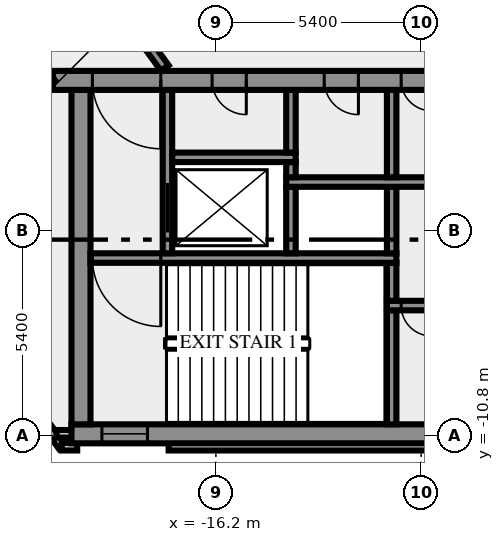
"""IFC4 building model, lengths in metres.
Left out: names, types, materials, properties, quantities, classifications, styles, units other than length and angle.
Written with IfcOpenShell. Run it as: python <this file> out.ifc"""

import sys

from ifc_helpers import new_model, si_unit, direction, frame, frame_2d, origin, place, context, subcontext, project, spatial, rectangle, extrude, element, fill, save


model = new_model("IFC4")
c1 = context("Model", 3, precision=1e-05, world=origin(), true_north=direction((0.0, 1.0)))
c2 = subcontext(c1, "Body", "Model", "MODEL_VIEW")
j1 = project(units=[si_unit("LENGTHUNIT", "METRE"), si_unit("PLANEANGLEUNIT", "RADIAN")], contexts=[c1])
p1 = place(None, origin())
s1 = spatial("IfcSite", under=j1, at=p1, CompositionType="ELEMENT")
p2 = place(p1, origin())
s2 = spatial("IfcBuilding", under=s1, at=p2, CompositionType="ELEMENT")
p3 = place(p2, frame((0.0, 0.0, 315.0)))
s3 = spatial("IfcBuildingStorey", under=s2, at=p3, CompositionType="ELEMENT", Elevation=315.0)
p4 = place(p3, frame((-21.833, -8.909, 0.0), z_axis=(0.0, 0.0, 1.0), x_axis=(0.587766567315, -0.809030569476, 0.0)))
e1 = element("IfcWall", 1, at=p4, inside=s3, PredefinedType="SOLIDWALL", context=c2, shape_type="SweptSolid", body=[
    extrude(rectangle(XDim=2.688, YDim=0.2, at=frame_2d((1.344, 0.0))), origin(), (0.0, 0.0, 1.0), 3.65),
])
p5 = place(p3, frame((-20.256, -11.088, 0.0), z_axis=(0.0, 0.0, 1.0), x_axis=(1.0, 0.0, 0.0)))
e2 = element("IfcWall", 2, at=p5, inside=s3, PredefinedType="SOLIDWALL", context=c2, shape_type="SweptSolid", body=[
    extrude(rectangle(XDim=0.406, YDim=0.2, at=frame_2d((0.203, 0.0))), origin(), (0.0, 0.0, 1.0), 3.65),
])
p6 = place(p3, frame((-17.444, -11.088, 0.0), z_axis=(0.0, 0.0, 1.0), x_axis=(1.0, 0.0, 0.0)))
e3 = element("IfcWall", 3, at=p6, inside=s3, PredefinedType="SOLIDWALL", context=c2, shape_type="SweptSolid", body=[
    extrude(rectangle(XDim=34.888, YDim=0.2, at=frame_2d((17.444, 0.0))), origin(), (0.0, 0.0, 1.0), 3.65),
])
p7 = place(p3, frame((-19.98, -10.75, 0.0), z_axis=(0.0, 0.0, 1.0), x_axis=(-1.0, 0.0, 0.0)))
e4 = element("IfcWall", 4, at=p7, inside=s3, PredefinedType="SOLIDWALL", context=c2, shape_type="SweptSolid", body=[
    extrude(rectangle(XDim=0.417, YDim=0.2, at=frame_2d((0.208, 0.0))), origin(), (0.0, 0.0, 1.0), 3.65),
])
p8 = place(p3, frame((-20.0, -10.75, 0.0), z_axis=(0.0, 0.0, 1.0), x_axis=(1.0, 0.0, 0.0)))
e5 = element("IfcWall", 5, at=p8, inside=s3, PredefinedType="SHEAR", context=c2, shape_type="SweptSolid", body=[
    extrude(rectangle(XDim=40.0, YDim=0.5, at=frame_2d((20.0, 0.0))), origin(), (0.0, 0.0, 1.0), 3.65),
])
p9 = place(p8, frame((0.8, 0.0, 1.0)))
e6 = element("IfcOpeningElement", 6, at=p9, cuts=e5, PredefinedType="OPENING", context=c2, shape_type="SweptSolid", body=[
    extrude(rectangle(XDim=1.2, YDim=1.2, at=frame_2d((0.6, 0.6))), frame((0.0, 0.26, 0.0), z_axis=(0.0, -1.0, 0.0), x_axis=(1.0, 0.0, 0.0)), (0.0, 0.0, 1.0), 0.52),
])
p10 = place(p8, frame((38.0, 0.0, 1.0)))
e7 = element("IfcOpeningElement", 7, at=p10, cuts=e5, PredefinedType="OPENING", context=c2, shape_type="SweptSolid", body=[
    extrude(rectangle(XDim=1.2, YDim=1.2, at=frame_2d((0.6, 0.6))), frame((0.0, 0.26, 0.0), z_axis=(0.0, -1.0, 0.0), x_axis=(1.0, 0.0, 0.0)), (0.0, 0.0, 1.0), 0.52),
])
p11 = place(p3, frame((-19.75, -10.5, 0.0), z_axis=(0.0, 0.0, 1.0), x_axis=(0.0, 1.0, 0.0)))
e8 = element("IfcWall", 8, at=p11, inside=s3, PredefinedType="SHEAR", context=c2, shape_type="SweptSolid", body=[
    extrude(rectangle(XDim=8.8, YDim=0.5, at=frame_2d((4.4, 0.0))), origin(), (0.0, 0.0, 1.0), 3.65),
])
p12 = place(p3, frame((-11.575, -10.5, 0.0), z_axis=(0.0, 0.0, 1.0), x_axis=(0.0, 1.0, 0.0)))
e9 = element("IfcWall", 9, at=p12, inside=s3, PredefinedType="SHEAR", context=c2, shape_type="SweptSolid", body=[
    extrude(rectangle(XDim=3.0, YDim=0.25, at=frame_2d((1.5, 0.0))), origin(), (0.0, 0.0, 1.0), 3.65),
])
p13 = place(p3, frame((11.7, -7.375, 0.0), z_axis=(0.0, 0.0, 1.0), x_axis=(-1.0, 0.0, 0.0)))
e10 = element("IfcWall", 10, at=p13, inside=s3, PredefinedType="SHEAR", context=c2, shape_type="SweptSolid", body=[
    extrude(rectangle(XDim=23.4, YDim=0.25, at=frame_2d((11.7, 0.0))), origin(), (0.0, 0.0, 1.0), 3.65),
])
p14 = place(p13, frame((22.225, 0.0, 0.0)))
e11 = element("IfcOpeningElement", 11, at=p14, cuts=e10, PredefinedType="OPENING", context=c2, shape_type="SweptSolid", body=[
    extrude(rectangle(XDim=0.8, YDim=2.1, at=frame_2d((0.4, 1.05))), frame((0.0, 0.135, 0.0), z_axis=(0.0, -1.0, 0.0), x_axis=(1.0, 0.0, 0.0)), (0.0, 0.0, 1.0), 0.27),
])
p15 = place(p13, frame((20.2, 0.0, 0.0)))
e12 = element("IfcOpeningElement", 12, at=p15, cuts=e10, PredefinedType="OPENING", context=c2, shape_type="SweptSolid", body=[
    extrude(rectangle(XDim=1.1, YDim=2.1, at=frame_2d((0.55, 1.05))), frame((0.0, 0.135, 0.0), z_axis=(0.0, -1.0, 0.0), x_axis=(1.0, 0.0, 0.0)), (0.0, 0.0, 1.0), 0.27),
])
p16 = place(p13, frame((17.7, 0.0, 0.0)))
e13 = element("IfcOpeningElement", 13, at=p16, cuts=e10, PredefinedType="OPENING", context=c2, shape_type="SweptSolid", body=[
    extrude(rectangle(XDim=1.1, YDim=2.1, at=frame_2d((0.55, 1.05))), frame((0.0, 0.135, 0.0), z_axis=(0.0, -1.0, 0.0), x_axis=(1.0, 0.0, 0.0)), (0.0, 0.0, 1.0), 0.27),
])
p17 = place(p13, frame((15.975, 0.0, 0.0)))
e14 = element("IfcOpeningElement", 14, at=p17, cuts=e10, PredefinedType="OPENING", context=c2, shape_type="SweptSolid", body=[
    extrude(rectangle(XDim=0.8, YDim=2.1, at=frame_2d((0.4, 1.05))), frame((0.0, 0.135, 0.0), z_axis=(0.0, -1.0, 0.0), x_axis=(1.0, 0.0, 0.0)), (0.0, 0.0, 1.0), 0.27),
])
p18 = place(p13, frame((14.65, 0.0, 0.0)))
e15 = element("IfcOpeningElement", 15, at=p18, cuts=e10, PredefinedType="OPENING", context=c2, shape_type="SweptSolid", body=[
    extrude(rectangle(XDim=0.8, YDim=2.1, at=frame_2d((0.4, 1.05))), frame((0.0, 0.135, 0.0), z_axis=(0.0, -1.0, 0.0), x_axis=(1.0, 0.0, 0.0)), (0.0, 0.0, 1.0), 0.27),
])
p19 = place(p13, frame((12.8, 0.0, 0.0)))
e16 = element("IfcOpeningElement", 16, at=p19, cuts=e10, PredefinedType="OPENING", context=c2, shape_type="SweptSolid", body=[
    extrude(rectangle(XDim=0.9, YDim=2.1, at=frame_2d((0.45, 1.05))), frame((0.0, 0.135, 0.0), z_axis=(0.0, -1.0, 0.0), x_axis=(1.0, 0.0, 0.0)), (0.0, 0.0, 1.0), 0.27),
])
p20 = place(p13, frame((10.7, 0.0, 0.0)))
e17 = element("IfcOpeningElement", 17, at=p20, cuts=e10, PredefinedType="OPENING", context=c2, shape_type="SweptSolid", body=[
    extrude(rectangle(XDim=0.9, YDim=2.1, at=frame_2d((0.45, 1.05))), frame((0.0, 0.135, 0.0), z_axis=(0.0, -1.0, 0.0), x_axis=(1.0, 0.0, 0.0)), (0.0, 0.0, 1.0), 0.27),
])
p21 = place(p13, frame((6.237, 0.0, 0.0)))
e18 = element("IfcOpeningElement", 18, at=p21, cuts=e10, PredefinedType="OPENING", context=c2, shape_type="SweptSolid", body=[
    extrude(rectangle(XDim=0.9, YDim=2.1, at=frame_2d((0.45, 1.05))), frame((0.0, 0.135, 0.0), z_axis=(0.0, -1.0, 0.0), x_axis=(1.0, 0.0, 0.0)), (0.0, 0.0, 1.0), 0.27),
])
p22 = place(p13, frame((1.263, 0.0, 0.0)))
e19 = element("IfcOpeningElement", 19, at=p22, cuts=e10, PredefinedType="OPENING", context=c2, shape_type="SweptSolid", body=[
    extrude(rectangle(XDim=0.9, YDim=2.1, at=frame_2d((0.45, 1.05))), frame((0.0, 0.135, 0.0), z_axis=(0.0, -1.0, 0.0), x_axis=(1.0, 0.0, 0.0)), (0.0, 0.0, 1.0), 0.27),
])
p23 = place(p3, frame((-11.575, -7.25, 0.0), z_axis=(0.0, 0.0, 1.0), x_axis=(0.0, 1.0, 0.0)))
e20 = element("IfcWall", 20, at=p23, inside=s3, PredefinedType="SHEAR", context=c2, shape_type="SweptSolid", body=[
    extrude(rectangle(XDim=1.0, YDim=0.25, at=frame_2d((0.5, 0.0))), origin(), (0.0, 0.0, 1.0), 3.65),
])
p24 = place(p3, frame((-11.45, -6.125, 0.0), z_axis=(0.0, 0.0, 1.0), x_axis=(-1.0, 0.0, 0.0)))
e21 = element("IfcWall", 21, at=p24, inside=s3, PredefinedType="SHEAR", context=c2, shape_type="SweptSolid", body=[
    extrude(rectangle(XDim=8.05, YDim=0.25, at=frame_2d((4.025, 0.0))), origin(), (0.0, 0.0, 1.0), 3.65),
])
p25 = place(p24, frame((6.2, 0.0, 0.0)))
e22 = element("IfcOpeningElement", 22, at=p25, cuts=e21, PredefinedType="OPENING", context=c2, shape_type="SweptSolid", body=[
    extrude(rectangle(XDim=1.8, YDim=2.1, at=frame_2d((0.9, 1.05))), frame((0.0, 0.135, 0.0), z_axis=(0.0, -1.0, 0.0), x_axis=(1.0, 0.0, 0.0)), (0.0, 0.0, 1.0), 0.27),
])
p26 = place(p3, frame((-17.475, -6.0, 0.0), z_axis=(0.0, 0.0, 1.0), x_axis=(0.0, 1.0, 0.0)))
e23 = element("IfcWall", 23, at=p26, inside=s3, PredefinedType="SHEAR", context=c2, shape_type="SweptSolid", body=[
    extrude(rectangle(XDim=4.3, YDim=0.25, at=frame_2d((2.15, 0.0))), origin(), (0.0, 0.0, 1.0), 3.65),
])
p27 = place(p26, frame((0.55, 0.0, 0.0)))
e24 = element("IfcOpeningElement", 24, at=p27, cuts=e23, PredefinedType="OPENING", context=c2, shape_type="SweptSolid", body=[
    extrude(rectangle(XDim=1.3, YDim=2.1, at=frame_2d((0.65, 1.05))), frame((0.0, 0.135, 0.0), z_axis=(0.0, -1.0, 0.0), x_axis=(1.0, 0.0, 0.0)), (0.0, 0.0, 1.0), 0.27),
])
for number, where, z_axis, x_axis in (
    (25, (-14.225, -6.0, 0.0), (0.0, 0.0, 1.0), (0.0, 1.0, 0.0)),
    (26, (-11.575, -6.0, 0.0), (0.0, 0.0, 1.0), (0.0, 1.0, 0.0)),
):
    element("IfcWall", number, at=place(p3, frame(where, z_axis=z_axis, x_axis=x_axis)), inside=s3, PredefinedType="SHEAR", context=c2, shape_type="SweptSolid", body=[
        extrude(rectangle(XDim=1.75, YDim=0.25, at=frame_2d((0.875, 0.0))), origin(), (0.0, 0.0, 1.0), 3.65),
    ])
p28 = place(p3, frame((-14.35, -4.125, 0.0), z_axis=(0.0, 0.0, 1.0), x_axis=(1.0, 0.0, 0.0)))
e27 = element("IfcWall", 27, at=p28, inside=s3, PredefinedType="SHEAR", context=c2, shape_type="SweptSolid", body=[
    extrude(rectangle(XDim=10.4, YDim=0.25, at=frame_2d((5.2, 0.0))), origin(), (0.0, 0.0, 1.0), 3.65),
])
p29 = place(p28, frame((4.75, 0.0, 0.0)))
e28 = element("IfcOpeningElement", 28, at=p29, cuts=e27, PredefinedType="OPENING", context=c2, shape_type="SweptSolid", body=[
    extrude(rectangle(XDim=1.1, YDim=2.1, at=frame_2d((0.55, 1.05))), frame((0.0, 0.135, 0.0), z_axis=(0.0, -1.0, 0.0), x_axis=(1.0, 0.0, 0.0)), (0.0, 0.0, 1.0), 0.27),
])
p30 = place(p28, frame((7.25, 0.0, 0.0)))
e29 = element("IfcOpeningElement", 29, at=p30, cuts=e27, PredefinedType="OPENING", context=c2, shape_type="SweptSolid", body=[
    extrude(rectangle(XDim=1.1, YDim=2.1, at=frame_2d((0.55, 1.05))), frame((0.0, 0.135, 0.0), z_axis=(0.0, -1.0, 0.0), x_axis=(1.0, 0.0, 0.0)), (0.0, 0.0, 1.0), 0.27),
])
p31 = place(p3, frame((-14.225, -4.0, 0.0), z_axis=(0.0, 0.0, 1.0), x_axis=(0.0, 1.0, 0.0)))
e30 = element("IfcWall", 30, at=p31, inside=s3, PredefinedType="SHEAR", context=c2, shape_type="SweptSolid", body=[
    extrude(rectangle(XDim=0.4, YDim=0.25, at=frame_2d((0.2, 0.0))), origin(), (0.0, 0.0, 1.0), 3.65),
])
p32 = place(p3, frame((-11.575, -4.0, 0.0), z_axis=(0.0, 0.0, 1.0), x_axis=(0.0, 1.0, 0.0)))
e31 = element("IfcWall", 31, at=p32, inside=s3, PredefinedType="SHEAR", context=c2, shape_type="SweptSolid", body=[
    extrude(rectangle(XDim=2.3, YDim=0.25, at=frame_2d((1.15, 0.0))), origin(), (0.0, 0.0, 1.0), 3.65),
])
p33 = place(p3, frame((-17.35, -3.475, 0.0), z_axis=(0.0, 0.0, 1.0), x_axis=(1.0, 0.0, 0.0)))
e32 = element("IfcWall", 32, at=p33, inside=s3, PredefinedType="SHEAR", context=c2, shape_type="SweptSolid", body=[
    extrude(rectangle(XDim=3.25, YDim=0.25, at=frame_2d((1.625, 0.0))), origin(), (0.0, 0.0, 1.0), 3.65),
])
p34 = place(p3, frame((-14.225, -3.35, 0.0), z_axis=(0.0, 0.0, 1.0), x_axis=(0.0, 1.0, 0.0)))
e33 = element("IfcWall", 33, at=p34, inside=s3, PredefinedType="SHEAR", context=c2, shape_type="SweptSolid", body=[
    extrude(rectangle(XDim=1.65, YDim=0.25, at=frame_2d((0.825, 0.0))), origin(), (0.0, 0.0, 1.0), 3.65),
])
p35 = place(p3, frame((20.49, -1.45, 0.0), z_axis=(0.0, 0.0, 1.0), x_axis=(-1.0, 0.0, 0.0)))
e34 = element("IfcWall", 34, at=p35, inside=s3, PredefinedType="SHEAR", context=c2, shape_type="SweptSolid", body=[
    extrude(rectangle(XDim=40.98, YDim=0.5, at=frame_2d((20.49, 0.0))), origin(), (0.0, 0.0, 1.0), 3.65),
])
p36 = place(p35, frame((38.14, 0.0, 0.0)))
e35 = element("IfcOpeningElement", 35, at=p36, cuts=e34, PredefinedType="OPENING", context=c2, shape_type="SweptSolid", body=[
    extrude(rectangle(XDim=1.8, YDim=2.1, at=frame_2d((0.9, 1.05))), frame((0.0, 0.26, 0.0), z_axis=(0.0, -1.0, 0.0), x_axis=(1.0, 0.0, 0.0)), (0.0, 0.0, 1.0), 0.52),
])
p37 = place(p35, frame((35.89, 0.0, 0.0)))
e36 = element("IfcOpeningElement", 36, at=p37, cuts=e34, PredefinedType="OPENING", context=c2, shape_type="SweptSolid", body=[
    extrude(rectangle(XDim=0.9, YDim=2.1, at=frame_2d((0.45, 1.05))), frame((0.0, 0.26, 0.0), z_axis=(0.0, -1.0, 0.0), x_axis=(1.0, 0.0, 0.0)), (0.0, 0.0, 1.0), 0.52),
])
p38 = place(p35, frame((32.94, 0.0, 0.0)))
e37 = element("IfcOpeningElement", 37, at=p38, cuts=e34, PredefinedType="OPENING", context=c2, shape_type="SweptSolid", body=[
    extrude(rectangle(XDim=0.9, YDim=2.1, at=frame_2d((0.45, 1.05))), frame((0.0, 0.26, 0.0), z_axis=(0.0, -1.0, 0.0), x_axis=(1.0, 0.0, 0.0)), (0.0, 0.0, 1.0), 0.52),
])
p39 = place(p35, frame((31.015, 0.0, 0.0)))
e38 = element("IfcOpeningElement", 38, at=p39, cuts=e34, PredefinedType="OPENING", context=c2, shape_type="SweptSolid", body=[
    extrude(rectangle(XDim=0.8, YDim=2.1, at=frame_2d((0.4, 1.05))), frame((0.0, 0.26, 0.0), z_axis=(0.0, -1.0, 0.0), x_axis=(1.0, 0.0, 0.0)), (0.0, 0.0, 1.0), 0.52),
])
p40 = place(p35, frame((24.765, 0.0, 0.0)))
e39 = element("IfcOpeningElement", 39, at=p40, cuts=e34, PredefinedType="OPENING", context=c2, shape_type="SweptSolid", body=[
    extrude(rectangle(XDim=0.8, YDim=2.1, at=frame_2d((0.4, 1.05))), frame((0.0, 0.26, 0.0), z_axis=(0.0, -1.0, 0.0), x_axis=(1.0, 0.0, 0.0)), (0.0, 0.0, 1.0), 0.52),
])
p41 = place(p35, frame((21.765, 0.0, 0.0)))
e40 = element("IfcOpeningElement", 40, at=p41, cuts=e34, PredefinedType="OPENING", context=c2, shape_type="SweptSolid", body=[
    extrude(rectangle(XDim=2.0, YDim=2.1, at=frame_2d((1.0, 1.05))), frame((0.0, 0.26, 0.0), z_axis=(0.0, -1.0, 0.0), x_axis=(1.0, 0.0, 0.0)), (0.0, 0.0, 1.0), 0.52),
])
p42 = place(p35, frame((12.24, 0.0, 0.0)))
e41 = element("IfcOpeningElement", 41, at=p42, cuts=e34, PredefinedType="OPENING", context=c2, shape_type="SweptSolid", body=[
    extrude(rectangle(XDim=0.9, YDim=2.1, at=frame_2d((0.45, 1.05))), frame((0.0, 0.26, 0.0), z_axis=(0.0, -1.0, 0.0), x_axis=(1.0, 0.0, 0.0)), (0.0, 0.0, 1.0), 0.52),
])
p43 = place(p35, frame((7.14, 0.0, 0.0)))
e42 = element("IfcOpeningElement", 42, at=p43, cuts=e34, PredefinedType="OPENING", context=c2, shape_type="SweptSolid", body=[
    extrude(rectangle(XDim=0.9, YDim=2.1, at=frame_2d((0.45, 1.05))), frame((0.0, 0.26, 0.0), z_axis=(0.0, -1.0, 0.0), x_axis=(1.0, 0.0, 0.0)), (0.0, 0.0, 1.0), 0.52),
])
p44 = place(p35, frame((5.028, 0.0, 0.0)))
e43 = element("IfcOpeningElement", 43, at=p44, cuts=e34, PredefinedType="OPENING", context=c2, shape_type="SweptSolid", body=[
    extrude(rectangle(XDim=0.8, YDim=2.1, at=frame_2d((0.4, 1.05))), frame((0.0, 0.26, 0.0), z_axis=(0.0, -1.0, 0.0), x_axis=(1.0, 0.0, 0.0)), (0.0, 0.0, 1.0), 0.52),
])
p45 = place(p35, frame((3.452, 0.0, 0.0)))
e44 = element("IfcOpeningElement", 44, at=p45, cuts=e34, PredefinedType="OPENING", context=c2, shape_type="SweptSolid", body=[
    extrude(rectangle(XDim=0.8, YDim=2.1, at=frame_2d((0.4, 1.05))), frame((0.0, 0.26, 0.0), z_axis=(0.0, -1.0, 0.0), x_axis=(1.0, 0.0, 0.0)), (0.0, 0.0, 1.0), 0.52),
])
p46 = place(p35, frame((1.04, 0.0, 0.0)))
e45 = element("IfcOpeningElement", 45, at=p46, cuts=e34, PredefinedType="OPENING", context=c2, shape_type="SweptSolid", body=[
    extrude(rectangle(XDim=1.8, YDim=2.1, at=frame_2d((0.9, 1.05))), frame((0.0, 0.26, 0.0), z_axis=(0.0, -1.0, 0.0), x_axis=(1.0, 0.0, 0.0)), (0.0, 0.0, 1.0), 0.52),
])
p47 = place(p3, frame((-20.531, -1.523, 0.0), z_axis=(0.0, 0.0, 1.0), x_axis=(-0.587785867777, 0.809016547199, 0.0)))
e46 = element("IfcWall", 46, at=p47, inside=s3, PredefinedType="SOLIDWALL", context=c2, shape_type="SweptSolid", body=[
    extrude(rectangle(XDim=16.67, YDim=0.25, at=frame_2d((8.335, 0.0))), origin(), (0.0, 0.0, 1.0), 3.65),
])
p48 = place(p47, frame((15.296, 0.0, 0.0)))
e47 = element("IfcOpeningElement", 47, at=p48, cuts=e46, PredefinedType="OPENING", context=c2, shape_type="SweptSolid", body=[
    extrude(rectangle(XDim=0.9, YDim=2.1, at=frame_2d((0.45, 1.05))), frame((0.0, 0.135, 0.0), z_axis=(0.0, -1.0, 0.0), x_axis=(1.0, 0.0, 0.0)), (0.0, 0.0, 1.0), 0.27),
])
p49 = place(p3, frame((-28.039, 13.319, 0.0), z_axis=(0.0, 0.0, 1.0), x_axis=(0.587791911753, -0.809012155952, 0.0)))
e48 = element("IfcWall", 48, at=p49, inside=s3, PredefinedType="SOLIDWALL", context=c2, shape_type="SweptSolid", body=[
    extrude(rectangle(XDim=17.853, YDim=0.25, at=frame_2d((8.927, 0.0))), origin(), (0.0, 0.0, 1.0), 3.65),
])
p50 = place(p49, frame((13.512, 0.0, 0.0)))
e49 = element("IfcOpeningElement", 49, at=p50, cuts=e48, PredefinedType="OPENING", context=c2, shape_type="SweptSolid", body=[
    extrude(rectangle(XDim=0.9, YDim=2.1, at=frame_2d((0.45, 1.05))), frame((0.0, 0.135, 0.0), z_axis=(0.0, -1.0, 0.0), x_axis=(1.0, 0.0, 0.0)), (0.0, 0.0, 1.0), 0.27),
])
p51 = place(p9, origin())
e50 = element("IfcWindow", 50, at=p51, inside=s3, PartitioningType="SINGLE_PANEL", PredefinedType="WINDOW", context=c2, shape_type="SweptSolid", body=[
    extrude(rectangle(XDim=1.2, YDim=1.2, at=frame_2d((0.6, 0.6))), frame((0.0, 0.03, 0.0), z_axis=(0.0, -1.0, 0.0), x_axis=(1.0, 0.0, 0.0)), (0.0, 0.0, 1.0), 0.06),
])
fill(e6, e50)
p52 = place(p14, origin())
e51 = element("IfcDoor", 51, at=p52, inside=s3, OperationType="SINGLE_SWING_RIGHT", PredefinedType="DOOR", context=c2, shape_type="SweptSolid", body=[
    extrude(rectangle(XDim=0.8, YDim=2.1, at=frame_2d((0.4, 1.05))), frame((0.0, 0.025, 0.0), z_axis=(0.0, -1.0, 0.0), x_axis=(1.0, 0.0, 0.0)), (0.0, 0.0, 1.0), 0.05),
])
fill(e11, e51)
p53 = place(p25, origin())
e52 = element("IfcDoor", 52, at=p53, inside=s3, OperationType="DOUBLE_DOOR_SINGLE_SWING", PredefinedType="DOOR", context=c2, shape_type="SweptSolid", body=[
    extrude(rectangle(XDim=1.8, YDim=2.1, at=frame_2d((0.9, 1.05))), frame((0.0, 0.025, 0.0), z_axis=(0.0, -1.0, 0.0), x_axis=(1.0, 0.0, 0.0)), (0.0, 0.0, 1.0), 0.05),
])
fill(e22, e52)
p54 = place(p27, origin())
e53 = element("IfcDoor", 53, at=p54, inside=s3, OperationType="DOUBLE_DOOR_SLIDING", PredefinedType="DOOR", context=c2, shape_type="SweptSolid", body=[
    extrude(rectangle(XDim=1.3, YDim=2.1, at=frame_2d((0.65, 1.05))), frame((0.0, 0.025, 0.0), z_axis=(0.0, -1.0, 0.0), x_axis=(1.0, 0.0, 0.0)), (0.0, 0.0, 1.0), 0.05),
])
fill(e24, e53)
p55 = place(p36, origin())
e54 = element("IfcDoor", 54, at=p55, inside=s3, OperationType="DOUBLE_DOOR_SINGLE_SWING", PredefinedType="DOOR", context=c2, shape_type="SweptSolid", body=[
    extrude(rectangle(XDim=1.8, YDim=2.1, at=frame_2d((0.9, 1.05))), frame((0.0, 0.025, 0.0), z_axis=(0.0, -1.0, 0.0), x_axis=(1.0, 0.0, 0.0)), (0.0, 0.0, 1.0), 0.05),
])
fill(e35, e54)
p56 = place(p37, origin())
e55 = element("IfcDoor", 55, at=p56, inside=s3, OperationType="SINGLE_SWING_RIGHT", PredefinedType="DOOR", context=c2, shape_type="SweptSolid", body=[
    extrude(rectangle(XDim=0.9, YDim=2.1, at=frame_2d((0.45, 1.05))), frame((0.0, 0.025, 0.0), z_axis=(0.0, -1.0, 0.0), x_axis=(1.0, 0.0, 0.0)), (0.0, 0.0, 1.0), 0.05),
])
fill(e36, e55)
p57 = place(p38, origin())
e56 = element("IfcDoor", 56, at=p57, inside=s3, OperationType="SINGLE_SWING_RIGHT", PredefinedType="DOOR", context=c2, shape_type="SweptSolid", body=[
    extrude(rectangle(XDim=0.9, YDim=2.1, at=frame_2d((0.45, 1.05))), frame((0.0, 0.025, 0.0), z_axis=(0.0, -1.0, 0.0), x_axis=(1.0, 0.0, 0.0)), (0.0, 0.0, 1.0), 0.05),
])
fill(e37, e56)
p58 = place(p39, origin())
e57 = element("IfcDoor", 57, at=p58, inside=s3, OperationType="SINGLE_SWING_RIGHT", PredefinedType="DOOR", context=c2, shape_type="SweptSolid", body=[
    extrude(rectangle(XDim=0.8, YDim=2.1, at=frame_2d((0.4, 1.05))), frame((0.0, 0.025, 0.0), z_axis=(0.0, -1.0, 0.0), x_axis=(1.0, 0.0, 0.0)), (0.0, 0.0, 1.0), 0.05),
])
fill(e38, e57)
save(model, sys.argv[1])
